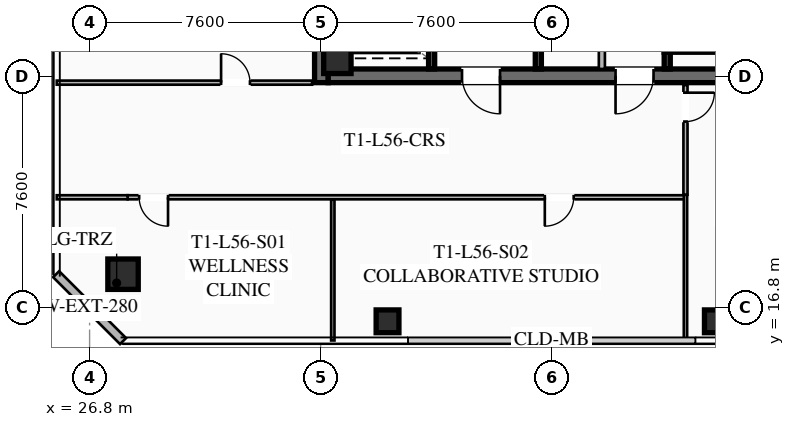
"""IFC4 building model, lengths in metres.
Left out: names, types, materials, properties, quantities, classifications, styles, units other than length and angle.
Written with IfcOpenShell. Run it as: python <this file> out.ifc"""

import sys

from ifc_helpers import new_model, si_unit, direction, frame, frame_2d, origin, origin_2d, place, context, subcontext, project, spatial, rectangle, hollow_rectangle, extrude, element, fill, save


model = new_model("IFC4")
c1 = context("Model", 3, precision=1e-05, world=origin(), true_north=direction((0.0, 1.0)))
c2 = subcontext(c1, "Body", "Model", "MODEL_VIEW")
j1 = project(units=[si_unit("LENGTHUNIT", "METRE"), si_unit("PLANEANGLEUNIT", "RADIAN")], contexts=[c1])
p1 = place(None, origin())
s1 = spatial("IfcSite", under=j1, at=p1, CompositionType="ELEMENT")
p2 = place(p1, origin())
s2 = spatial("IfcBuilding", under=s1, at=p2, CompositionType="ELEMENT")
p3 = place(p2, frame((0.0, 0.0, 207.75)))
s3 = spatial("IfcBuildingStorey", under=s2, at=p3, CompositionType="ELEMENT", Elevation=207.75)
p4 = place(p3, frame((34.425, 24.2, 0.0), z_axis=(0.0, 0.0, 1.0), x_axis=(0.0, 1.0, 0.0)))
e1 = element("IfcWall", 1, at=p4, inside=s3, PredefinedType="SHEAR", context=c2, shape_type="SweptSolid", body=[
    extrude(rectangle(XDim=15.6, YDim=0.45, at=frame_2d((7.8, 0.0))), origin(), (0.0, 0.0, 1.0), 3.55),
])
p5 = place(p3, frame((49.35, 24.425, 0.0), z_axis=(0.0, 0.0, 1.0), x_axis=(-1.0, 0.0, 0.0)))
e2 = element("IfcWall", 2, at=p5, inside=s3, PredefinedType="SHEAR", context=c2, shape_type="SweptSolid", body=[
    extrude(rectangle(XDim=14.7, YDim=0.45, at=frame_2d((7.35, 0.0))), origin(), (0.0, 0.0, 1.0), 3.55),
])
p6 = place(p5, frame((9.05, 0.0, 0.0)))
e3 = element("IfcOpeningElement", 3, at=p6, cuts=e2, PredefinedType="OPENING", context=c2, shape_type="SweptSolid", body=[
    extrude(rectangle(XDim=1.25, YDim=2.25, at=frame_2d((0.625, 1.125))), frame((0.0, 0.235, 0.0), z_axis=(0.0, -1.0, 0.0), x_axis=(1.0, 0.0, 0.0)), (0.0, 0.0, 1.0), 0.47),
])
p7 = place(p5, frame((4.0, 0.0, 0.0)))
e4 = element("IfcOpeningElement", 4, at=p7, cuts=e2, PredefinedType="OPENING", context=c2, shape_type="SweptSolid", body=[
    extrude(rectangle(XDim=1.25, YDim=2.25, at=frame_2d((0.625, 1.125))), frame((0.0, 0.235, 0.0), z_axis=(0.0, -1.0, 0.0), x_axis=(1.0, 0.0, 0.0)), (0.0, 0.0, 1.0), 0.47),
])
p8 = place(p3, frame((34.95, 24.95, 0.0), z_axis=(0.0, 0.0, 1.0), x_axis=(1.0, 0.0, 0.0)))
e5 = element("IfcColumn", 5, at=p8, inside=s3, PredefinedType="COLUMN", context=c2, shape_type="SweptSolid", body=[
    extrude(hollow_rectangle(XDim=0.9, YDim=0.9, WallThickness=0.04, at=origin_2d()), origin(), (0.0, 0.0, 1.0), 3.37),
])
p9 = place(p3, frame((27.9, 17.9, 0.0), z_axis=(0.0, 0.0, 1.0), x_axis=(1.0, 0.0, 0.0)))
e6 = element("IfcColumn", 6, at=p9, inside=s3, PredefinedType="COLUMN", context=c2, shape_type="SweptSolid", body=[
    extrude(hollow_rectangle(XDim=1.0, YDim=1.0, WallThickness=0.04, at=origin_2d()), origin(), (0.0, 0.0, 1.0), 3.37),
])
for number, where, z_axis, x_axis in (
    (7, (36.6, 16.35, 0.0), (0.0, 0.0, 1.0), (1.0, 0.0, 0.0)),
    (8, (47.4, 16.35, 0.0), (0.0, 0.0, 1.0), (1.0, 0.0, 0.0)),
):
    element("IfcColumn", number, at=place(p3, frame(where, z_axis=z_axis, x_axis=x_axis)), inside=s3, PredefinedType="COLUMN", context=c2, shape_type="SweptSolid", body=[
        extrude(hollow_rectangle(XDim=0.75, YDim=0.75, WallThickness=0.032, at=origin_2d()), origin(), (0.0, 0.0, 1.0), 3.37),
    ])
p10 = place(p3, frame((27.9, 15.7, 0.0), z_axis=(0.0, 0.0, 1.0), x_axis=(-0.707106781187, 0.707106781187, 0.0)))
e9 = element("IfcWall", 9, at=p10, inside=s3, PredefinedType="SOLIDWALL", context=c2, shape_type="SweptSolid", body=[
    extrude(rectangle(XDim=3.111, YDim=0.28, at=frame_2d((1.556, 0.0))), origin(), (0.0, 0.0, 1.0), 3.37),
])
p11 = place(p3, frame((45.8, 32.8, 0.0), z_axis=(0.0, 0.0, 1.0), x_axis=(0.0, -1.0, 0.0)))
e10 = element("IfcWall", 10, at=p11, inside=s3, PredefinedType="SHEAR", context=c2, shape_type="SweptSolid", body=[
    extrude(rectangle(XDim=8.15, YDim=0.2, at=frame_2d((4.075, 0.0))), origin(), (0.0, 0.0, 1.0), 3.37),
])
p12 = place(p11, frame((0.45, 0.0, 0.0)))
e11 = element("IfcOpeningElement", 11, at=p12, cuts=e10, PredefinedType="OPENING", context=c2, shape_type="SweptSolid", body=[
    extrude(rectangle(XDim=1.15, YDim=2.2, at=frame_2d((0.575, 1.1))), frame((0.0, 0.11, 0.0), z_axis=(0.0, -1.0, 0.0), x_axis=(1.0, 0.0, 0.0)), (0.0, 0.0, 1.0), 0.22),
])
p13 = place(p3, frame((41.56, 24.65, 0.0), z_axis=(0.0, 0.0, 1.0), x_axis=(0.0, 1.0, 0.0)))
e12 = element("IfcWall", 12, at=p13, inside=s3, PredefinedType="SHEAR", context=c2, shape_type="SweptSolid", body=[
    extrude(rectangle(XDim=14.7, YDim=0.2, at=frame_2d((7.35, 0.0))), origin(), (0.0, 0.0, 1.0), 3.37),
])
p14 = place(p3, frame((38.05, 24.65, 0.0), z_axis=(0.0, 0.0, 1.0), x_axis=(0.0, 1.0, 0.0)))
e13 = element("IfcWall", 13, at=p14, inside=s3, PredefinedType="SHEAR", context=c2, shape_type="SweptSolid", body=[
    extrude(rectangle(XDim=6.55, YDim=0.2, at=frame_2d((3.275, 0.0))), origin(), (0.0, 0.0, 1.0), 3.37),
])
p15 = place(p14, frame((4.975, 0.0, 0.0)))
e14 = element("IfcOpeningElement", 14, at=p15, cuts=e13, PredefinedType="OPENING", context=c2, shape_type="SweptSolid", body=[
    extrude(rectangle(XDim=1.3, YDim=2.25, at=frame_2d((0.65, 1.125))), frame((0.0, 0.11, 0.0), z_axis=(0.0, -1.0, 0.0), x_axis=(1.0, 0.0, 0.0)), (0.0, 0.0, 1.0), 0.22),
])
p16 = place(p14, frame((2.975, 0.0, 0.0)))
e15 = element("IfcOpeningElement", 15, at=p16, cuts=e13, PredefinedType="OPENING", context=c2, shape_type="SweptSolid", body=[
    extrude(rectangle(XDim=1.3, YDim=2.25, at=frame_2d((0.65, 1.125))), frame((0.0, 0.11, 0.0), z_axis=(0.0, -1.0, 0.0), x_axis=(1.0, 0.0, 0.0)), (0.0, 0.0, 1.0), 0.22),
])
p17 = place(p14, frame((0.775, 0.0, 0.0)))
e16 = element("IfcOpeningElement", 16, at=p17, cuts=e13, PredefinedType="OPENING", context=c2, shape_type="SweptSolid", body=[
    extrude(rectangle(XDim=1.3, YDim=2.25, at=frame_2d((0.65, 1.125))), frame((0.0, 0.11, 0.0), z_axis=(0.0, -1.0, 0.0), x_axis=(1.0, 0.0, 0.0)), (0.0, 0.0, 1.0), 0.22),
])
p18 = place(p3, frame((43.65, 24.65, 0.0), z_axis=(0.0, 0.0, 1.0), x_axis=(0.0, 1.0, 0.0)))
e17 = element("IfcWall", 17, at=p18, inside=s3, PredefinedType="SOLIDWALL", context=c2, shape_type="SweptSolid", body=[
    extrude(rectangle(XDim=7.0, YDim=0.2, at=frame_2d((3.5, 0.0))), origin(), (0.0, 0.0, 1.0), 2.723),
])
p19 = place(p18, frame((0.85, 0.0, 0.0)))
e18 = element("IfcOpeningElement", 18, at=p19, cuts=e17, PredefinedType="OPENING", context=c2, shape_type="SweptSolid", body=[
    extrude(rectangle(XDim=0.95, YDim=2.05, at=frame_2d((0.475, 1.025))), frame((0.0, 0.11, 0.0), z_axis=(0.0, -1.0, 0.0), x_axis=(1.0, 0.0, 0.0)), (0.0, 0.0, 1.0), 0.22),
])
p20 = place(p18, frame((4.8, 0.0, 0.0)))
e19 = element("IfcOpeningElement", 19, at=p20, cuts=e17, PredefinedType="OPENING", context=c2, shape_type="SweptSolid", body=[
    extrude(rectangle(XDim=1.05, YDim=2.2, at=frame_2d((0.525, 1.1))), frame((0.0, 0.11, 0.0), z_axis=(0.0, -1.0, 0.0), x_axis=(1.0, 0.0, 0.0)), (0.0, 0.0, 1.0), 0.22),
])
p21 = place(p3, frame((46.4, 20.43, 0.0), z_axis=(0.0, 0.0, 1.0), x_axis=(-1.0, 0.0, 0.0)))
e20 = element("IfcWall", 20, at=p21, inside=s3, PredefinedType="PARTITIONING", context=c2, shape_type="SweptSolid", body=[
    extrude(rectangle(XDim=18.35, YDim=0.135, at=frame_2d((9.175, 0.0))), origin(), (0.0, 0.0, 1.0), 2.723),
])
p22 = place(p21, frame((17.02, 0.0, 0.0)))
e21 = element("IfcOpeningElement", 21, at=p22, cuts=e20, PredefinedType="OPENING", context=c2, shape_type="SweptSolid", body=[
    extrude(rectangle(XDim=0.95, YDim=2.05, at=frame_2d((0.475, 1.025))), frame((0.0, 0.077, 0.0), z_axis=(0.0, -1.0, 0.0), x_axis=(1.0, 0.0, 0.0)), (0.0, 0.0, 1.0), 0.155),
])
p23 = place(p21, frame((3.677, 0.0, 0.0)))
e22 = element("IfcOpeningElement", 22, at=p23, cuts=e20, PredefinedType="OPENING", context=c2, shape_type="SweptSolid", body=[
    extrude(rectangle(XDim=0.95, YDim=2.05, at=frame_2d((0.475, 1.025))), frame((0.0, 0.077, 0.0), z_axis=(0.0, -1.0, 0.0), x_axis=(1.0, 0.0, 0.0)), (0.0, 0.0, 1.0), 0.155),
])
p24 = place(p3, frame((25.72, 20.43, 0.0), z_axis=(0.0, 0.0, 1.0), x_axis=(1.0, 0.0, 0.0)))
e23 = element("IfcWall", 23, at=p24, inside=s3, PredefinedType="PARTITIONING", context=c2, shape_type="SweptSolid", body=[
    extrude(rectangle(XDim=2.33, YDim=0.135, at=frame_2d((1.165, 0.0))), origin(), (0.0, 0.0, 1.0), 2.723),
])
p25 = place(p3, frame((46.4, 24.12, 0.0), z_axis=(0.0, 0.0, 1.0), x_axis=(0.0, -1.0, 0.0)))
e24 = element("IfcWall", 24, at=p25, inside=s3, PredefinedType="PARTITIONING", context=c2, shape_type="SweptSolid", body=[
    extrude(rectangle(XDim=3.61, YDim=0.135, at=frame_2d((1.805, 0.0))), origin(), (0.0, 0.0, 1.0), 2.723),
])
p26 = place(p25, frame((0.25, 0.0, 0.0)))
e25 = element("IfcOpeningElement", 25, at=p26, cuts=e24, PredefinedType="OPENING", context=c2, shape_type="SweptSolid", body=[
    extrude(rectangle(XDim=0.95, YDim=2.05, at=frame_2d((0.475, 1.025))), frame((0.0, 0.077, 0.0), z_axis=(0.0, -1.0, 0.0), x_axis=(1.0, 0.0, 0.0)), (0.0, 0.0, 1.0), 0.155),
])
p27 = place(p3, frame((34.8, 15.72, 0.0), z_axis=(0.0, 0.0, 1.0), x_axis=(0.0, 1.0, 0.0)))
e26 = element("IfcWall", 26, at=p27, inside=s3, PredefinedType="PARTITIONING", context=c2, shape_type="SweptSolid", body=[
    extrude(rectangle(XDim=4.63, YDim=0.11, at=frame_2d((2.315, 0.0))), origin(), (0.0, 0.0, 1.0), 2.723),
])
p28 = place(p3, frame((46.4, 15.72, 0.0), z_axis=(0.0, 0.0, 1.0), x_axis=(0.0, 1.0, 0.0)))
e27 = element("IfcWall", 27, at=p28, inside=s3, PredefinedType="PARTITIONING", context=c2, shape_type="SweptSolid", body=[
    extrude(rectangle(XDim=4.79, YDim=0.11, at=frame_2d((2.395, 0.0))), origin(), (0.0, 0.0, 1.0), 2.723),
])
p29 = place(p3, frame((25.72, 24.2, 0.0), z_axis=(0.0, 0.0, 1.0), x_axis=(1.0, 0.0, 0.0)))
e28 = element("IfcWall", 28, at=p29, inside=s3, PredefinedType="PARTITIONING", context=c2, shape_type="SweptSolid", body=[
    extrude(rectangle(XDim=8.4, YDim=0.135, at=frame_2d((4.2, 0.0))), origin(), (0.0, 0.0, 1.0), 2.723),
])
p30 = place(p29, frame((5.405, 0.0, 0.0)))
e29 = element("IfcOpeningElement", 29, at=p30, cuts=e28, PredefinedType="OPENING", context=c2, shape_type="SweptSolid", body=[
    extrude(rectangle(XDim=0.95, YDim=2.05, at=frame_2d((0.475, 1.025))), frame((0.0, 0.077, 0.0), z_axis=(0.0, -1.0, 0.0), x_axis=(1.0, 0.0, 0.0)), (0.0, 0.0, 1.0), 0.155),
])
p31 = place(p6, origin())
e30 = element("IfcDoor", 30, at=p31, inside=s3, OperationType="SINGLE_SWING_LEFT", PredefinedType="DOOR", context=c2, shape_type="SweptSolid", body=[
    extrude(rectangle(XDim=1.25, YDim=2.25, at=frame_2d((0.625, 1.125))), frame((0.0, 0.025, 0.0), z_axis=(0.0, -1.0, 0.0), x_axis=(1.0, 0.0, 0.0)), (0.0, 0.0, 1.0), 0.05),
])
fill(e3, e30)
p32 = place(p7, origin())
e31 = element("IfcDoor", 31, at=p32, inside=s3, OperationType="SINGLE_SWING_RIGHT", PredefinedType="DOOR", context=c2, shape_type="SweptSolid", body=[
    extrude(rectangle(XDim=1.25, YDim=2.25, at=frame_2d((0.625, 1.125))), frame((0.0, 0.025, 0.0), z_axis=(0.0, -1.0, 0.0), x_axis=(1.0, 0.0, 0.0)), (0.0, 0.0, 1.0), 0.05),
])
fill(e4, e31)
p33 = place(p22, origin())
e32 = element("IfcDoor", 32, at=p33, inside=s3, OperationType="SINGLE_SWING_LEFT", PredefinedType="DOOR", context=c2, shape_type="SweptSolid", body=[
    extrude(rectangle(XDim=0.95, YDim=2.05, at=frame_2d((0.475, 1.025))), frame((0.0, 0.025, 0.0), z_axis=(0.0, -1.0, 0.0), x_axis=(1.0, 0.0, 0.0)), (0.0, 0.0, 1.0), 0.05),
])
fill(e21, e32)
p34 = place(p23, origin())
e33 = element("IfcDoor", 33, at=p34, inside=s3, OperationType="SINGLE_SWING_RIGHT", PredefinedType="DOOR", context=c2, shape_type="SweptSolid", body=[
    extrude(rectangle(XDim=0.95, YDim=2.05, at=frame_2d((0.475, 1.025))), frame((0.0, 0.025, 0.0), z_axis=(0.0, -1.0, 0.0), x_axis=(1.0, 0.0, 0.0)), (0.0, 0.0, 1.0), 0.05),
])
fill(e22, e33)
p35 = place(p26, origin())
e34 = element("IfcDoor", 34, at=p35, inside=s3, OperationType="SINGLE_SWING_LEFT", PredefinedType="DOOR", context=c2, shape_type="SweptSolid", body=[
    extrude(rectangle(XDim=0.95, YDim=2.05, at=frame_2d((0.475, 1.025))), frame((0.0, 0.025, 0.0), z_axis=(0.0, -1.0, 0.0), x_axis=(1.0, 0.0, 0.0)), (0.0, 0.0, 1.0), 0.05),
])
fill(e25, e34)
p36 = place(p30, origin())
e35 = element("IfcDoor", 35, at=p36, inside=s3, OperationType="SINGLE_SWING_LEFT", PredefinedType="DOOR", context=c2, shape_type="SweptSolid", body=[
    extrude(rectangle(XDim=0.95, YDim=2.05, at=frame_2d((0.475, 1.025))), frame((0.0, 0.025, 0.0), z_axis=(0.0, -1.0, 0.0), x_axis=(1.0, 0.0, 0.0)), (0.0, 0.0, 1.0), 0.05),
])
fill(e29, e35)
save(model, sys.argv[1])
